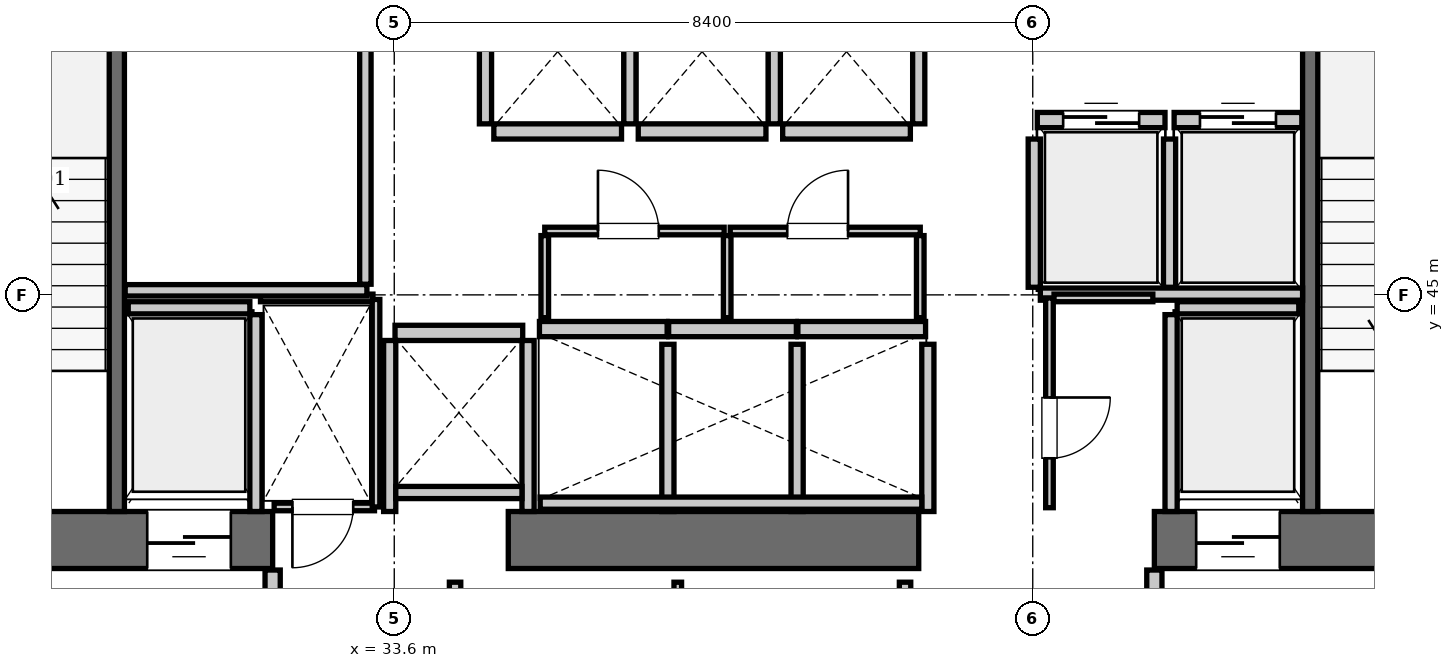
"""IFC4 building model, lengths in metres.
Left out: names, types, materials, properties, quantities, classifications, styles, units other than length and angle.
Written with IfcOpenShell. Run it as: python <this file> out.ifc"""

import sys

from ifc_helpers import new_model, si_unit, direction, frame, frame_2d, origin, place, context, subcontext, project, spatial, rectangle, extrude, element, fill, save


model = new_model("IFC4")
c1 = context("Model", 3, precision=1e-05, world=origin(), true_north=direction((0.0, 1.0)))
c2 = subcontext(c1, "Body", "Model", "MODEL_VIEW")
j1 = project(units=[si_unit("LENGTHUNIT", "METRE"), si_unit("PLANEANGLEUNIT", "RADIAN")], contexts=[c1])
p1 = place(None, origin())
s1 = spatial("IfcSite", under=j1, at=p1, CompositionType="ELEMENT")
p2 = place(p1, origin())
s2 = spatial("IfcBuilding", under=s1, at=p2, CompositionType="ELEMENT")
p3 = place(p2, frame((0.0, 0.0, 169.75)))
s3 = spatial("IfcBuildingStorey", under=s2, at=p3, CompositionType="ELEMENT", Elevation=169.75)
p4 = place(p3, frame((25.2, 41.775, 0.0), z_axis=(0.0, 0.0, 1.0), x_axis=(1.0, 0.0, 0.0)))
e1 = element("IfcWall", 1, at=p4, inside=s3, PredefinedType="SHEAR", context=c2, shape_type="SweptSolid", body=[
    extrude(rectangle(XDim=6.8, YDim=0.75, at=frame_2d((3.4, 0.0))), origin(), (0.0, 0.0, 1.0), 3.85),
])
p5 = place(p4, frame((1.65, 0.0, 0.0)))
e2 = element("IfcOpeningElement", 2, at=p5, cuts=e1, PredefinedType="OPENING", context=c2, shape_type="SweptSolid", body=[
    extrude(rectangle(XDim=1.15, YDim=2.15, at=frame_2d((0.575, 1.075))), frame((0.0, 0.385, 0.0), z_axis=(0.0, -1.0, 0.0), x_axis=(1.0, 0.0, 0.0)), (0.0, 0.0, 1.0), 0.77),
])
p6 = place(p4, frame((5.15, 0.0, 0.0)))
e3 = element("IfcOpeningElement", 3, at=p6, cuts=e1, PredefinedType="OPENING", context=c2, shape_type="SweptSolid", body=[
    extrude(rectangle(XDim=1.1, YDim=2.2, at=frame_2d((0.55, 1.1))), frame((0.0, 0.385, 0.0), z_axis=(0.0, -1.0, 0.0), x_axis=(1.0, 0.0, 0.0)), (0.0, 0.0, 1.0), 0.77),
])
p7 = place(p3, frame((35.1, 41.775, 0.0), z_axis=(0.0, 0.0, 1.0), x_axis=(1.0, 0.0, 0.0)))
e4 = element("IfcWall", 4, at=p7, inside=s3, PredefinedType="SHEAR", context=c2, shape_type="SweptSolid", body=[
    extrude(rectangle(XDim=5.4, YDim=0.75, at=frame_2d((2.7, 0.0))), origin(), (0.0, 0.0, 1.0), 3.85),
])
p8 = place(p3, frame((43.6, 41.775, 0.0), z_axis=(0.0, 0.0, 1.0), x_axis=(1.0, 0.0, 0.0)))
e5 = element("IfcWall", 5, at=p8, inside=s3, PredefinedType="SHEAR", context=c2, shape_type="SweptSolid", body=[
    extrude(rectangle(XDim=6.8, YDim=0.75, at=frame_2d((3.4, 0.0))), origin(), (0.0, 0.0, 1.0), 3.85),
])
p9 = place(p8, frame((3.9, 0.0, 0.0)))
e6 = element("IfcOpeningElement", 6, at=p9, cuts=e5, PredefinedType="OPENING", context=c2, shape_type="SweptSolid", body=[
    extrude(rectangle(XDim=1.15, YDim=2.15, at=frame_2d((0.575, 1.075))), frame((0.0, 0.385, 0.0), z_axis=(0.0, -1.0, 0.0), x_axis=(1.0, 0.0, 0.0)), (0.0, 0.0, 1.0), 0.77),
])
p10 = place(p8, frame((0.55, 0.0, 0.0)))
e7 = element("IfcOpeningElement", 7, at=p10, cuts=e5, PredefinedType="OPENING", context=c2, shape_type="SweptSolid", body=[
    extrude(rectangle(XDim=1.1, YDim=2.2, at=frame_2d((0.55, 1.1))), frame((0.0, 0.385, 0.0), z_axis=(0.0, -1.0, 0.0), x_axis=(1.0, 0.0, 0.0)), (0.0, 0.0, 1.0), 0.77),
])
for number, where, z_axis, x_axis in (
    (8, (29.95, 42.15, 0.0), (0.0, 0.0, 1.0), (0.0, 1.0, 0.0)),
    (9, (45.65, 42.15, 0.0), (0.0, 0.0, 1.0), (0.0, 1.0, 0.0)),
):
    element("IfcWall", number, at=place(p3, frame(where, z_axis=z_axis, x_axis=x_axis)), inside=s3, PredefinedType="SOLIDWALL", context=c2, shape_type="SweptSolid", body=[
        extrude(rectangle(XDim=9.0, YDim=0.2, at=frame_2d((4.5, 0.0))), origin(), (0.0, 0.0, 1.0), 3.61),
    ])
p11 = place(p3, frame((42.06, 47.3, 0.0), z_axis=(0.0, 0.0, 1.0), x_axis=(1.0, 0.0, 0.0)))
e10 = element("IfcWall", 10, at=p11, inside=s3, PredefinedType="SOLIDWALL", context=c2, shape_type="SweptSolid", body=[
    extrude(rectangle(XDim=1.68, YDim=0.2, at=frame_2d((0.84, 0.0))), origin(), (0.0, 0.0, 1.0), 3.61),
])
p12 = place(p11, frame((0.34, 0.0, 0.0)))
e11 = element("IfcOpeningElement", 11, at=p12, cuts=e10, PredefinedType="OPENING", context=c2, shape_type="SweptSolid", body=[
    extrude(rectangle(XDim=1.0, YDim=2.15, at=frame_2d((0.5, 1.075))), frame((0.0, 0.11, 0.0), z_axis=(0.0, -1.0, 0.0), x_axis=(1.0, 0.0, 0.0)), (0.0, 0.0, 1.0), 0.22),
])
p13 = place(p3, frame((43.86, 47.3, 0.0), z_axis=(0.0, 0.0, 1.0), x_axis=(1.0, 0.0, 0.0)))
e12 = element("IfcWall", 12, at=p13, inside=s3, PredefinedType="SOLIDWALL", context=c2, shape_type="SweptSolid", body=[
    extrude(rectangle(XDim=1.68, YDim=0.2, at=frame_2d((0.84, 0.0))), origin(), (0.0, 0.0, 1.0), 3.61),
])
p14 = place(p13, frame((0.34, 0.0, 0.0)))
e13 = element("IfcOpeningElement", 13, at=p14, cuts=e12, PredefinedType="OPENING", context=c2, shape_type="SweptSolid", body=[
    extrude(rectangle(XDim=1.0, YDim=2.15, at=frame_2d((0.5, 1.075))), frame((0.0, 0.11, 0.0), z_axis=(0.0, -1.0, 0.0), x_axis=(1.0, 0.0, 0.0)), (0.0, 0.0, 1.0), 0.22),
])
for number, where, z_axis, x_axis in (
    (14, (35.51, 44.55, 0.0), (0.0, 0.0, 1.0), (1.0, 0.0, 0.0)),
    (15, (37.21, 44.55, 0.0), (0.0, 0.0, 1.0), (1.0, 0.0, 0.0)),
):
    element("IfcWall", number, at=place(p3, frame(where, z_axis=z_axis, x_axis=x_axis)), inside=s3, PredefinedType="SOLIDWALL", context=c2, shape_type="SweptSolid", body=[
        extrude(rectangle(XDim=1.68, YDim=0.2, at=frame_2d((0.84, 0.0))), origin(), (0.0, 0.0, 1.0), 3.61),
    ])
for number, where, z_axis, x_axis in (
    (16, (38.91, 44.55, 0.0), (0.0, 0.0, 1.0), (1.0, 0.0, 0.0)),
    (17, (34.91, 47.15, 0.0), (0.0, 0.0, 1.0), (1.0, 0.0, 0.0)),
):
    element("IfcWall", number, at=place(p3, frame(where, z_axis=z_axis, x_axis=x_axis)), inside=s3, PredefinedType="SOLIDWALL", context=c2, shape_type="SweptSolid", body=[
        extrude(rectangle(XDim=1.68, YDim=0.2, at=frame_2d((0.84, 0.0))), origin(), (0.0, 0.0, 1.0), 3.61),
    ])
for number, where, z_axis, x_axis in (
    (18, (36.81, 47.15, 0.0), (0.0, 0.0, 1.0), (1.0, 0.0, 0.0)),
    (19, (38.71, 47.15, 0.0), (0.0, 0.0, 1.0), (1.0, 0.0, 0.0)),
    (20, (33.61, 44.5, 0.0), (0.0, 0.0, 1.0), (1.0, 0.0, 0.0)),
):
    element("IfcWall", number, at=place(p3, frame(where, z_axis=z_axis, x_axis=x_axis)), inside=s3, PredefinedType="SOLIDWALL", context=c2, shape_type="SweptSolid", body=[
        extrude(rectangle(XDim=1.68, YDim=0.2, at=frame_2d((0.84, 0.0))), origin(), (0.0, 0.0, 1.0), 3.61),
    ])
p15 = place(p3, frame((30.1, 44.83, 0.0), z_axis=(0.0, 0.0, 1.0), x_axis=(1.0, 0.0, 0.0)))
e21 = element("IfcWall", 21, at=p15, inside=s3, PredefinedType="SOLIDWALL", context=c2, shape_type="SweptSolid", body=[
    extrude(rectangle(XDim=1.6, YDim=0.16, at=frame_2d((0.8, 0.0))), origin(), (0.0, 0.0, 1.0), 3.61),
])
p16 = place(p3, frame((31.78, 42.15, 0.0), z_axis=(0.0, 0.0, 1.0), x_axis=(0.0, 1.0, 0.0)))
e22 = element("IfcWall", 22, at=p16, inside=s3, PredefinedType="SOLIDWALL", context=c2, shape_type="SweptSolid", body=[
    extrude(rectangle(XDim=2.59, YDim=0.16, at=frame_2d((1.295, 0.0))), origin(), (0.0, 0.0, 1.0), 3.61),
])
p17 = place(p3, frame((43.9, 44.83, 0.0), z_axis=(0.0, 0.0, 1.0), x_axis=(1.0, 0.0, 0.0)))
e23 = element("IfcWall", 23, at=p17, inside=s3, PredefinedType="SOLIDWALL", context=c2, shape_type="SweptSolid", body=[
    extrude(rectangle(XDim=1.6, YDim=0.16, at=frame_2d((0.8, 0.0))), origin(), (0.0, 0.0, 1.0), 3.61),
])
p18 = place(p3, frame((43.82, 42.15, 0.0), z_axis=(0.0, 0.0, 1.0), x_axis=(0.0, 1.0, 0.0)))
e24 = element("IfcWall", 24, at=p18, inside=s3, PredefinedType="SOLIDWALL", context=c2, shape_type="SweptSolid", body=[
    extrude(rectangle(XDim=2.59, YDim=0.16, at=frame_2d((1.295, 0.0))), origin(), (0.0, 0.0, 1.0), 3.61),
])
for number, where, z_axis, x_axis in (
    (25, (42.02, 45.1, 0.0), (0.0, 0.0, 1.0), (0.0, 1.0, 0.0)),
    (26, (43.8, 45.1, 0.0), (0.0, 0.0, 1.0), (0.0, 1.0, 0.0)),
):
    element("IfcWall", number, at=place(p3, frame(where, z_axis=z_axis, x_axis=x_axis)), inside=s3, PredefinedType="SOLIDWALL", context=c2, shape_type="SweptSolid", body=[
        extrude(rectangle(XDim=1.95, YDim=0.16, at=frame_2d((0.975, 0.0))), origin(), (0.0, 0.0, 1.0), 3.61),
    ])
p19 = place(p3, frame((42.1, 45.01, 0.0), z_axis=(0.0, 0.0, 1.0), x_axis=(1.0, 0.0, 0.0)))
e27 = element("IfcWall", 27, at=p19, inside=s3, PredefinedType="SOLIDWALL", context=c2, shape_type="SweptSolid", body=[
    extrude(rectangle(XDim=3.45, YDim=0.16, at=frame_2d((1.725, 0.0))), origin(), (0.0, 0.0, 1.0), 3.61),
])
for number, where, z_axis, x_axis in (
    (28, (37.2, 42.15, 0.0), (0.0, 0.0, 1.0), (0.0, 1.0, 0.0)),
    (29, (38.9, 42.15, 0.0), (0.0, 0.0, 1.0), (0.0, 1.0, 0.0)),
    (30, (40.62, 42.15, 0.0), (0.0, 0.0, 1.0), (0.0, 1.0, 0.0)),
):
    element("IfcWall", number, at=place(p3, frame(where, z_axis=z_axis, x_axis=x_axis)), inside=s3, PredefinedType="SOLIDWALL", context=c2, shape_type="SweptSolid", body=[
        extrude(rectangle(XDim=2.2, YDim=0.16, at=frame_2d((1.1, 0.0))), origin(), (0.0, 0.0, 1.0), 3.61),
    ])
p20 = place(p3, frame((35.52, 42.26, 0.0), z_axis=(0.0, 0.0, 1.0), x_axis=(1.0, 0.0, 0.0)))
e31 = element("IfcWall", 31, at=p20, inside=s3, PredefinedType="SOLIDWALL", context=c2, shape_type="SweptSolid", body=[
    extrude(rectangle(XDim=5.02, YDim=0.16, at=frame_2d((2.51, 0.0))), origin(), (0.0, 0.0, 1.0), 3.61),
])
for number, where, z_axis, x_axis in (
    (32, (34.8, 47.25, 0.0), (0.0, 0.0, 1.0), (0.0, 1.0, 0.0)),
    (33, (36.7, 47.25, 0.0), (0.0, 0.0, 1.0), (0.0, 1.0, 0.0)),
    (34, (38.6, 47.25, 0.0), (0.0, 0.0, 1.0), (0.0, 1.0, 0.0)),
    (35, (40.5, 47.25, 0.0), (0.0, 0.0, 1.0), (0.0, 1.0, 0.0)),
):
    element("IfcWall", number, at=place(p3, frame(where, z_axis=z_axis, x_axis=x_axis)), inside=s3, PredefinedType="SOLIDWALL", context=c2, shape_type="SweptSolid", body=[
        extrude(rectangle(XDim=2.19, YDim=0.16, at=frame_2d((1.095, 0.0))), origin(), (0.0, 0.0, 1.0), 3.61),
    ])
for number, where, z_axis, x_axis in (
    (36, (33.54, 42.15, 0.0), (0.0, 0.0, 1.0), (0.0, 1.0, 0.0)),
    (37, (35.36, 42.15, 0.0), (0.0, 0.0, 1.0), (0.0, 1.0, 0.0)),
):
    element("IfcWall", number, at=place(p3, frame(where, z_axis=z_axis, x_axis=x_axis)), inside=s3, PredefinedType="SOLIDWALL", context=c2, shape_type="SweptSolid", body=[
        extrude(rectangle(XDim=2.25, YDim=0.16, at=frame_2d((1.125, 0.0))), origin(), (0.0, 0.0, 1.0), 3.61),
    ])
p21 = place(p3, frame((33.62, 42.4, 0.0), z_axis=(0.0, 0.0, 1.0), x_axis=(1.0, 0.0, 0.0)))
e38 = element("IfcWall", 38, at=p21, inside=s3, PredefinedType="SOLIDWALL", context=c2, shape_type="SweptSolid", body=[
    extrude(rectangle(XDim=1.66, YDim=0.16, at=frame_2d((0.83, 0.0))), origin(), (0.0, 0.0, 1.0), 3.61),
])
for number, where, z_axis, x_axis in (
    (39, (32.0, 38.31, 0.0), (0.0, 0.0, 1.0), (0.0, 1.0, 0.0)),
    (40, (43.6, 38.31, 0.0), (0.0, 0.0, 1.0), (0.0, 1.0, 0.0)),
):
    element("IfcWall", number, at=place(p3, frame(where, z_axis=z_axis, x_axis=x_axis)), inside=s3, PredefinedType="PARTITIONING", context=c2, shape_type="SweptSolid", body=[
        extrude(rectangle(XDim=3.07, YDim=0.2, at=frame_2d((1.535, 0.0))), origin(), (0.0, 0.0, 1.0), 3.61),
    ])
p22 = place(p3, frame((32.02, 42.21, 0.0), z_axis=(0.0, 0.0, 1.0), x_axis=(1.0, 0.0, 0.0)))
e41 = element("IfcWall", 41, at=p22, inside=s3, PredefinedType="PARTITIONING", context=c2, shape_type="SweptSolid", body=[
    extrude(rectangle(XDim=1.32, YDim=0.1, at=frame_2d((0.66, 0.0))), origin(), (0.0, 0.0, 1.0), 3.61),
])
p23 = place(p22, frame((0.24, 0.0, 0.0)))
e42 = element("IfcOpeningElement", 42, at=p23, cuts=e41, PredefinedType="OPENING", context=c2, shape_type="SweptSolid", body=[
    extrude(rectangle(XDim=0.8, YDim=2.05, at=frame_2d((0.4, 1.025))), frame((0.0, 0.06, 0.0), z_axis=(0.0, -1.0, 0.0), x_axis=(1.0, 0.0, 0.0)), (0.0, 0.0, 1.0), 0.12),
])
p24 = place(p3, frame((31.84, 44.96, 0.0), z_axis=(0.0, 0.0, 1.0), x_axis=(1.0, 0.0, 0.0)))
e43 = element("IfcWall", 43, at=p24, inside=s3, PredefinedType="PARTITIONING", context=c2, shape_type="SweptSolid", body=[
    extrude(rectangle(XDim=1.48, YDim=0.1, at=frame_2d((0.74, 0.0))), origin(), (0.0, 0.0, 1.0), 3.61),
])
p25 = place(p3, frame((33.36, 42.21, 0.0), z_axis=(0.0, 0.0, 1.0), x_axis=(0.0, 1.0, 0.0)))
e44 = element("IfcWall", 44, at=p25, inside=s3, PredefinedType="PARTITIONING", context=c2, shape_type="SweptSolid", body=[
    extrude(rectangle(XDim=2.73, YDim=0.1, at=frame_2d((1.365, 0.0))), origin(), (0.0, 0.0, 1.0), 3.61),
])
p26 = place(p3, frame((35.58, 45.84, 0.0), z_axis=(0.0, 0.0, 1.0), x_axis=(1.0, 0.0, 0.0)))
e45 = element("IfcWall", 45, at=p26, inside=s3, PredefinedType="PARTITIONING", context=c2, shape_type="SweptSolid", body=[
    extrude(rectangle(XDim=2.36, YDim=0.1, at=frame_2d((1.18, 0.0))), origin(), (0.0, 0.0, 1.0), 3.61),
])
p27 = place(p26, frame((0.7, 0.0, 0.0)))
e46 = element("IfcOpeningElement", 46, at=p27, cuts=e45, PredefinedType="OPENING", context=c2, shape_type="SweptSolid", body=[
    extrude(rectangle(XDim=0.8, YDim=2.05, at=frame_2d((0.4, 1.025))), frame((0.0, 0.06, 0.0), z_axis=(0.0, -1.0, 0.0), x_axis=(1.0, 0.0, 0.0)), (0.0, 0.0, 1.0), 0.12),
])
p28 = place(p3, frame((38.02, 45.84, 0.0), z_axis=(0.0, 0.0, 1.0), x_axis=(1.0, 0.0, 0.0)))
e47 = element("IfcWall", 47, at=p28, inside=s3, PredefinedType="PARTITIONING", context=c2, shape_type="SweptSolid", body=[
    extrude(rectangle(XDim=2.5, YDim=0.1, at=frame_2d((1.25, 0.0))), origin(), (0.0, 0.0, 1.0), 3.61),
])
p29 = place(p28, frame((0.75, 0.0, 0.0)))
e48 = element("IfcOpeningElement", 48, at=p29, cuts=e47, PredefinedType="OPENING", context=c2, shape_type="SweptSolid", body=[
    extrude(rectangle(XDim=0.8, YDim=2.05, at=frame_2d((0.4, 1.025))), frame((0.0, 0.06, 0.0), z_axis=(0.0, -1.0, 0.0), x_axis=(1.0, 0.0, 0.0)), (0.0, 0.0, 1.0), 0.12),
])
for number, where, z_axis, x_axis in (
    (49, (35.58, 44.7, 0.0), (0.0, 0.0, 1.0), (0.0, 1.0, 0.0)),
    (50, (37.98, 44.7, 0.0), (0.0, 0.0, 1.0), (0.0, 1.0, 0.0)),
    (51, (40.52, 44.7, 0.0), (0.0, 0.0, 1.0), (0.0, 1.0, 0.0)),
):
    element("IfcWall", number, at=place(p3, frame(where, z_axis=z_axis, x_axis=x_axis)), inside=s3, PredefinedType="PARTITIONING", context=c2, shape_type="SweptSolid", body=[
        extrude(rectangle(XDim=1.08, YDim=0.1, at=frame_2d((0.54, 0.0))), origin(), (0.0, 0.0, 1.0), 3.61),
    ])
p30 = place(p3, frame((42.22, 42.2, 0.0), z_axis=(0.0, 0.0, 1.0), x_axis=(0.0, 1.0, 0.0)))
e52 = element("IfcWall", 52, at=p30, inside=s3, PredefinedType="PARTITIONING", context=c2, shape_type="SweptSolid", body=[
    extrude(rectangle(XDim=2.76, YDim=0.1, at=frame_2d((1.38, 0.0))), origin(), (0.0, 0.0, 1.0), 3.61),
])
p31 = place(p30, frame((0.65, 0.0, 0.0)))
e53 = element("IfcOpeningElement", 53, at=p31, cuts=e52, PredefinedType="OPENING", context=c2, shape_type="SweptSolid", body=[
    extrude(rectangle(XDim=0.8, YDim=2.05, at=frame_2d((0.4, 1.025))), frame((0.0, 0.06, 0.0), z_axis=(0.0, -1.0, 0.0), x_axis=(1.0, 0.0, 0.0)), (0.0, 0.0, 1.0), 0.12),
])
p32 = place(p3, frame((42.28, 44.96, 0.0), z_axis=(0.0, 0.0, 1.0), x_axis=(1.0, 0.0, 0.0)))
e54 = element("IfcWall", 54, at=p32, inside=s3, PredefinedType="PARTITIONING", context=c2, shape_type="SweptSolid", body=[
    extrude(rectangle(XDim=1.3, YDim=0.1, at=frame_2d((0.65, 0.0))), origin(), (0.0, 0.0, 1.0), 3.61),
])
p33 = place(p3, frame((30.06, 45.06, 0.0), z_axis=(0.0, 0.0, 1.0), x_axis=(1.0, 0.0, 0.0)))
e55 = element("IfcWall", 55, at=p33, inside=s3, PredefinedType="PARTITIONING", context=c2, shape_type="SweptSolid", body=[
    extrude(rectangle(XDim=3.18, YDim=0.15, at=frame_2d((1.59, 0.0))), origin(), (0.0, 0.0, 1.0), 3.61),
])
p34 = place(p3, frame((33.22, 45.14, 0.0), z_axis=(0.0, 0.0, 1.0), x_axis=(0.0, 1.0, 0.0)))
e56 = element("IfcWall", 56, at=p34, inside=s3, PredefinedType="PARTITIONING", context=c2, shape_type="SweptSolid", body=[
    extrude(rectangle(XDim=4.16, YDim=0.15, at=frame_2d((2.08, 0.0))), origin(), (0.0, 0.0, 1.0), 3.61),
])
p35 = place(p3, frame((34.4, 38.38, 0.0), z_axis=(0.0, 0.0, 1.0), x_axis=(0.0, 1.0, 0.0)))
e57 = element("IfcWall", 57, at=p35, inside=s3, PredefinedType="PARTITIONING", context=c2, shape_type="SweptSolid", body=[
    extrude(rectangle(XDim=2.84, YDim=0.15, at=frame_2d((1.42, 0.0))), origin(), (0.0, 0.0, 1.0), 3.61),
])
p36 = place(p3, frame((37.33, 38.38, 0.0), z_axis=(0.0, 0.0, 1.0), x_axis=(0.0, 1.0, 0.0)))
e58 = element("IfcWall", 58, at=p36, inside=s3, PredefinedType="PARTITIONING", context=c2, shape_type="SweptSolid", body=[
    extrude(rectangle(XDim=2.84, YDim=0.1, at=frame_2d((1.42, 0.0))), origin(), (0.0, 0.0, 1.0), 3.61),
])
p37 = place(p3, frame((40.32, 38.38, 0.0), z_axis=(0.0, 0.0, 1.0), x_axis=(0.0, 1.0, 0.0)))
e59 = element("IfcWall", 59, at=p37, inside=s3, PredefinedType="PARTITIONING", context=c2, shape_type="SweptSolid", body=[
    extrude(rectangle(XDim=2.84, YDim=0.15, at=frame_2d((1.42, 0.0))), origin(), (0.0, 0.0, 1.0), 3.61),
])
p38 = place(p12, origin())
e60 = element("IfcDoor", 60, at=p38, inside=s3, OperationType="SLIDING_TO_LEFT", PredefinedType="DOOR", context=c2, shape_type="SweptSolid", body=[
    extrude(rectangle(XDim=1.0, YDim=2.15, at=frame_2d((0.5, 1.075))), frame((0.0, 0.025, 0.0), z_axis=(0.0, -1.0, 0.0), x_axis=(1.0, 0.0, 0.0)), (0.0, 0.0, 1.0), 0.05),
])
fill(e11, e60)
p39 = place(p14, origin())
e61 = element("IfcDoor", 61, at=p39, inside=s3, OperationType="SLIDING_TO_LEFT", PredefinedType="DOOR", context=c2, shape_type="SweptSolid", body=[
    extrude(rectangle(XDim=1.0, YDim=2.15, at=frame_2d((0.5, 1.075))), frame((0.0, 0.025, 0.0), z_axis=(0.0, -1.0, 0.0), x_axis=(1.0, 0.0, 0.0)), (0.0, 0.0, 1.0), 0.05),
])
fill(e13, e61)
p40 = place(p6, frame((1.1, 0.0, 0.0), z_axis=(0.0, 0.0, 1.0), x_axis=(-1.0, 0.0, 0.0)))
e62 = element("IfcDoor", 62, at=p40, inside=s3, OperationType="SLIDING_TO_LEFT", PredefinedType="DOOR", context=c2, shape_type="SweptSolid", body=[
    extrude(rectangle(XDim=1.1, YDim=2.2, at=frame_2d((0.55, 1.1))), frame((0.0, 0.025, 0.0), z_axis=(0.0, -1.0, 0.0), x_axis=(1.0, 0.0, 0.0)), (0.0, 0.0, 1.0), 0.05),
])
fill(e3, e62)
p41 = place(p10, frame((1.1, 0.0, 0.0), z_axis=(0.0, 0.0, 1.0), x_axis=(-1.0, 0.0, 0.0)))
e63 = element("IfcDoor", 63, at=p41, inside=s3, OperationType="SLIDING_TO_LEFT", PredefinedType="DOOR", context=c2, shape_type="SweptSolid", body=[
    extrude(rectangle(XDim=1.1, YDim=2.2, at=frame_2d((0.55, 1.1))), frame((0.0, 0.025, 0.0), z_axis=(0.0, -1.0, 0.0), x_axis=(1.0, 0.0, 0.0)), (0.0, 0.0, 1.0), 0.05),
])
fill(e7, e63)
p42 = place(p23, frame((0.8, 0.0, 0.0), z_axis=(0.0, 0.0, 1.0), x_axis=(-1.0, 0.0, 0.0)))
e64 = element("IfcDoor", 64, at=p42, inside=s3, OperationType="SINGLE_SWING_RIGHT", PredefinedType="DOOR", context=c2, shape_type="SweptSolid", body=[
    extrude(rectangle(XDim=0.8, YDim=2.05, at=frame_2d((0.4, 1.025))), frame((0.0, 0.025, 0.0), z_axis=(0.0, -1.0, 0.0), x_axis=(1.0, 0.0, 0.0)), (0.0, 0.0, 1.0), 0.05),
])
fill(e42, e64)
p43 = place(p27, origin())
e65 = element("IfcDoor", 65, at=p43, inside=s3, OperationType="SINGLE_SWING_LEFT", PredefinedType="DOOR", context=c2, shape_type="SweptSolid", body=[
    extrude(rectangle(XDim=0.8, YDim=2.05, at=frame_2d((0.4, 1.025))), frame((0.0, 0.025, 0.0), z_axis=(0.0, -1.0, 0.0), x_axis=(1.0, 0.0, 0.0)), (0.0, 0.0, 1.0), 0.05),
])
fill(e46, e65)
p44 = place(p29, origin())
e66 = element("IfcDoor", 66, at=p44, inside=s3, OperationType="SINGLE_SWING_RIGHT", PredefinedType="DOOR", context=c2, shape_type="SweptSolid", body=[
    extrude(rectangle(XDim=0.8, YDim=2.05, at=frame_2d((0.4, 1.025))), frame((0.0, 0.025, 0.0), z_axis=(0.0, -1.0, 0.0), x_axis=(1.0, 0.0, 0.0)), (0.0, 0.0, 1.0), 0.05),
])
fill(e48, e66)
p45 = place(p31, frame((0.8, 0.0, 0.0), z_axis=(0.0, 0.0, 1.0), x_axis=(-1.0, 0.0, 0.0)))
e67 = element("IfcDoor", 67, at=p45, inside=s3, OperationType="SINGLE_SWING_LEFT", PredefinedType="DOOR", context=c2, shape_type="SweptSolid", body=[
    extrude(rectangle(XDim=0.8, YDim=2.05, at=frame_2d((0.4, 1.025))), frame((0.0, 0.025, 0.0), z_axis=(0.0, -1.0, 0.0), x_axis=(1.0, 0.0, 0.0)), (0.0, 0.0, 1.0), 0.05),
])
fill(e53, e67)
save(model, sys.argv[1])
